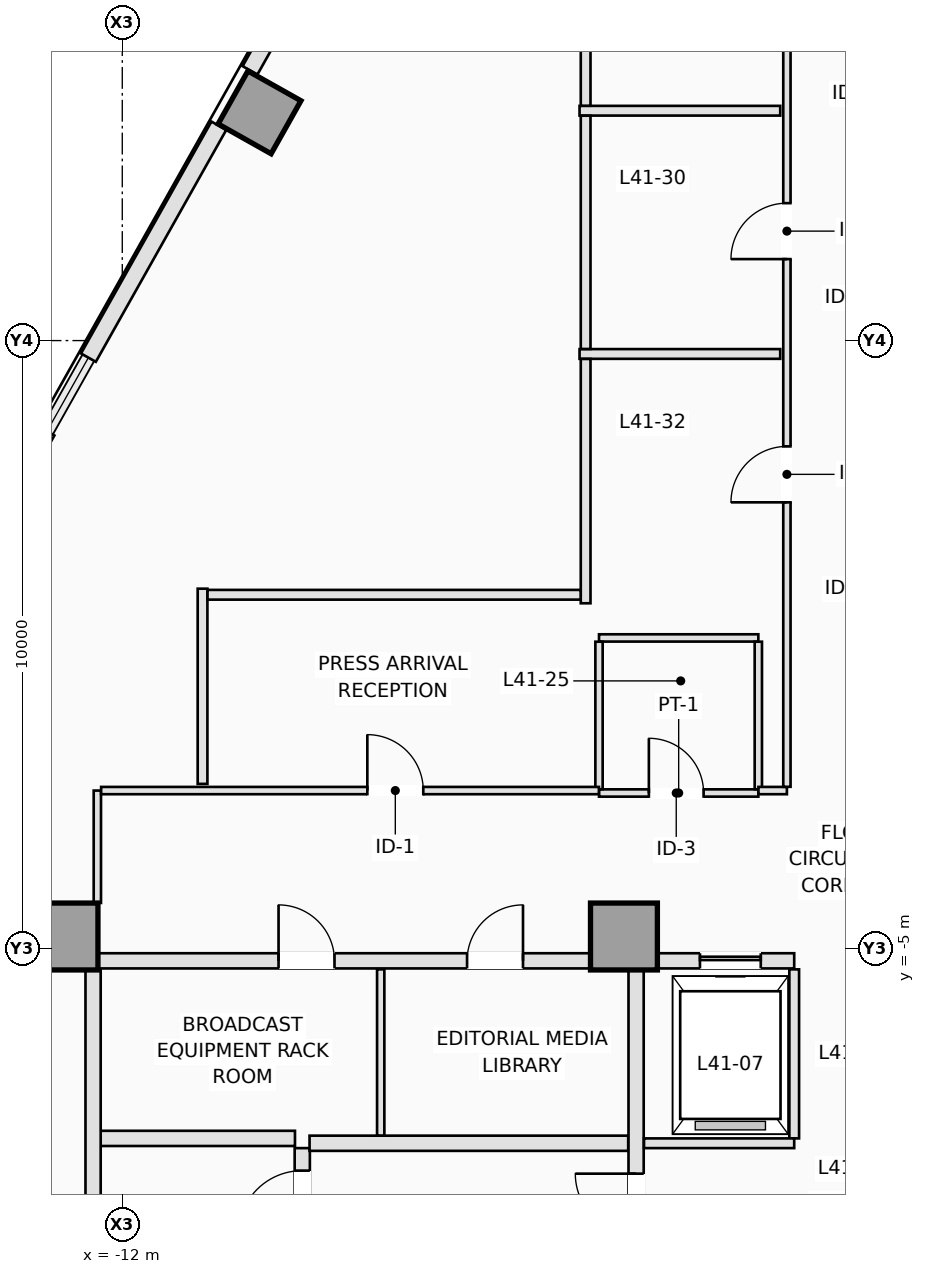
"""IFC4 building model, lengths in metres.
Left out: names, types, materials, properties, quantities, classifications, styles, units other than length and angle.
Written with IfcOpenShell. Run it as: python <this file> out.ifc"""

import sys

from ifc_helpers import new_model, si_unit, direction, frame, frame_2d, origin, origin_2d, place, context, subcontext, project, spatial, rectangle, extrude, element, fill, save


model = new_model("IFC4")
c1 = context("Model", 3, precision=1e-05, world=origin(), true_north=direction((0.0, 1.0)))
c2 = subcontext(c1, "Body", "Model", "MODEL_VIEW")
j1 = project(units=[si_unit("LENGTHUNIT", "METRE"), si_unit("PLANEANGLEUNIT", "RADIAN")], contexts=[c1])
p1 = place(None, origin())
s1 = spatial("IfcSite", under=j1, at=p1, CompositionType="ELEMENT")
p2 = place(p1, origin())
s2 = spatial("IfcBuilding", under=s1, at=p2, CompositionType="ELEMENT")
p3 = place(p2, frame((0.0, 0.0, 151.0)))
s3 = spatial("IfcBuildingStorey", under=s2, at=p3, CompositionType="ELEMENT", Elevation=151.0)
for number, where, z_axis, x_axis in (
    (1, (-12.95, -4.8, 0.0), (0.0, 0.0, 1.0), (1.0, 0.0, 0.0)),
    (2, (-3.75, -4.8, 0.0), (0.0, 0.0, 1.0), (1.0, 0.0, 0.0)),
):
    element("IfcColumn", number, at=place(p3, frame(where, z_axis=z_axis, x_axis=x_axis)), inside=s3, PredefinedType="COLUMN", context=c2, shape_type="SweptSolid", body=[
        extrude(rectangle(XDim=1.1, YDim=1.1, at=origin_2d()), origin(), (0.0, 0.0, 1.0), 3.5),
    ])
p4 = place(p3, frame((-9.743, 8.753, 0.0), z_axis=(0.0, 0.0, 1.0), x_axis=(-0.871575139605, 0.490261946333, 0.0)))
e3 = element("IfcColumn", 3, at=p4, inside=s3, PredefinedType="COLUMN", context=c2, shape_type="SweptSolid", body=[
    extrude(rectangle(XDim=1.0, YDim=1.0, at=origin_2d()), origin(), (0.0, 0.0, 1.0), 3.5),
])
p5 = place(p3, frame((-9.9, 9.444, 0.0), z_axis=(0.0, 0.0, 1.0), x_axis=(0.490412424957, 0.871490478116, 0.0)))
e4 = element("IfcWall", 4, at=p5, inside=s3, PredefinedType="STANDARD", context=c2, shape_type="SweptSolid", body=[
    extrude(rectangle(XDim=0.46, YDim=0.28, at=frame_2d((0.23, 0.0))), origin(), (0.0, 0.0, 1.0), 3.25),
])
p6 = place(p3, frame((-15.383, -0.305, 0.0), z_axis=(0.0, 0.0, 1.0), x_axis=(0.490232095789, 0.871591929895, 0.0)))
e5 = element("IfcWall", 5, at=p6, inside=s3, PredefinedType="STANDARD", context=c2, shape_type="SweptSolid", body=[
    extrude(rectangle(XDim=4.375, YDim=0.28, at=frame_2d((2.188, 0.0))), origin(), (0.0, 0.0, 1.0), 3.25),
])
p7 = place(p3, frame((-12.557, 4.72, 0.0), z_axis=(0.0, 0.0, 1.0), x_axis=(0.490274486291, 0.871568085747, 0.0)))
e6 = element("IfcWall", 6, at=p7, inside=s3, PredefinedType="STANDARD", context=c2, shape_type="SweptSolid", body=[
    extrude(rectangle(XDim=4.375, YDim=0.28, at=frame_2d((2.188, 0.0))), origin(), (0.0, 0.0, 1.0), 3.25),
])
p8 = place(p3, frame((-9.04, -10.18, 0.0), z_axis=(0.0, 0.0, 1.0), x_axis=(0.0, 1.0, 0.0)))
e7 = element("IfcWall", 7, at=p8, inside=s3, PredefinedType="PARTITIONING", context=c2, shape_type="SweptSolid", body=[
    extrude(rectangle(XDim=1.9, YDim=0.25, at=frame_2d((0.95, 0.0))), origin(), (0.0, 0.0, 1.0), 3.25),
])
p9 = place(p8, frame((0.48, 0.0, 0.0)))
e8 = element("IfcOpeningElement", 8, at=p9, cuts=e7, PredefinedType="OPENING", context=c2, shape_type="SweptSolid", body=[
    extrude(rectangle(XDim=1.05, YDim=2.15, at=frame_2d((0.525, 1.075))), frame((0.0, 0.135, 0.0), z_axis=(0.0, -1.0, 0.0), x_axis=(1.0, 0.0, 0.0)), (0.0, 0.0, 1.0), 0.27),
])
p10 = place(p3, frame((-12.38, -8.12, 0.0), z_axis=(0.0, 0.0, 1.0), x_axis=(1.0, 0.0, 0.0)))
e9 = element("IfcWall", 9, at=p10, inside=s3, PredefinedType="PARTITIONING", context=c2, shape_type="SweptSolid", body=[
    extrude(rectangle(XDim=3.22, YDim=0.25, at=frame_2d((1.61, 0.0))), origin(), (0.0, 0.0, 1.0), 3.25),
])
p11 = place(p3, frame((-12.48, -10.18, 0.0), z_axis=(0.0, 0.0, 1.0), x_axis=(0.0, 1.0, 0.0)))
e10 = element("IfcWall", 10, at=p11, inside=s3, PredefinedType="PARTITIONING", context=c2, shape_type="SweptSolid", body=[
    extrude(rectangle(XDim=4.828, YDim=0.25, at=frame_2d((2.414, 0.0))), origin(), (0.0, 0.0, 1.0), 3.25),
])
p12 = place(p3, frame((-8.92, -8.2, 0.0), z_axis=(0.0, 0.0, 1.0), x_axis=(1.0, 0.0, 0.0)))
e11 = element("IfcWall", 11, at=p12, inside=s3, PredefinedType="PARTITIONING", context=c2, shape_type="SweptSolid", body=[
    extrude(rectangle(XDim=5.24, YDim=0.25, at=frame_2d((2.62, 0.0))), origin(), (0.0, 0.0, 1.0), 3.25),
])
p13 = place(p3, frame((-3.55, -15.798, 0.0), z_axis=(0.0, 0.0, 1.0), x_axis=(0.0, 1.0, 0.0)))
e12 = element("IfcWall", 12, at=p13, inside=s3, PredefinedType="PARTITIONING", context=c2, shape_type="SweptSolid", body=[
    extrude(rectangle(XDim=10.446, YDim=0.25, at=frame_2d((5.223, 0.0))), origin(), (0.0, 0.0, 1.0), 3.25),
])
p14 = place(p13, frame((6.098, 0.0, 0.0)))
e13 = element("IfcOpeningElement", 13, at=p14, cuts=e12, PredefinedType="OPENING", context=c2, shape_type="SweptSolid", body=[
    extrude(rectangle(XDim=1.0, YDim=2.15, at=frame_2d((0.5, 1.075))), frame((0.0, 0.135, 0.0), z_axis=(0.0, -1.0, 0.0), x_axis=(1.0, 0.0, 0.0)), (0.0, 0.0, 1.0), 0.27),
])
p15 = place(p3, frame((-12.398, -5.2, 0.0), z_axis=(0.0, 0.0, 1.0), x_axis=(1.0, 0.0, 0.0)))
e14 = element("IfcWall", 14, at=p15, inside=s3, PredefinedType="PARTITIONING", context=c2, shape_type="SweptSolid", body=[
    extrude(rectangle(XDim=8.096, YDim=0.25, at=frame_2d((4.048, 0.0))), origin(), (0.0, 0.0, 1.0), 3.25),
])
p16 = place(p15, frame((2.968, 0.0, 0.0)))
e15 = element("IfcOpeningElement", 15, at=p16, cuts=e14, PredefinedType="OPENING", context=c2, shape_type="SweptSolid", body=[
    extrude(rectangle(XDim=0.92, YDim=2.12, at=frame_2d((0.46, 1.06))), frame((0.0, 0.135, 0.0), z_axis=(0.0, -1.0, 0.0), x_axis=(1.0, 0.0, 0.0)), (0.0, 0.0, 1.0), 0.27),
])
p17 = place(p15, frame((6.068, 0.0, 0.0)))
e16 = element("IfcOpeningElement", 16, at=p17, cuts=e14, PredefinedType="OPENING", context=c2, shape_type="SweptSolid", body=[
    extrude(rectangle(XDim=0.92, YDim=2.12, at=frame_2d((0.46, 1.06))), frame((0.0, 0.135, 0.0), z_axis=(0.0, -1.0, 0.0), x_axis=(1.0, 0.0, 0.0)), (0.0, 0.0, 1.0), 0.27),
])
p18 = place(p3, frame((-3.198, -5.2, 0.0), z_axis=(0.0, 0.0, 1.0), x_axis=(1.0, 0.0, 0.0)))
e17 = element("IfcWall", 17, at=p18, inside=s3, PredefinedType="PARTITIONING", context=c2, shape_type="SweptSolid", body=[
    extrude(rectangle(XDim=2.248, YDim=0.25, at=frame_2d((1.124, 0.0))), origin(), (0.0, 0.0, 1.0), 3.25),
])
p19 = place(p18, frame((0.698, 0.0, 0.0)))
e18 = element("IfcOpeningElement", 18, at=p19, cuts=e17, PredefinedType="OPENING", context=c2, shape_type="SweptSolid", body=[
    extrude(rectangle(XDim=1.0, YDim=2.15, at=frame_2d((0.5, 1.075))), frame((0.0, 0.135, 0.0), z_axis=(0.0, -1.0, 0.0), x_axis=(1.0, 0.0, 0.0)), (0.0, 0.0, 1.0), 0.27),
])
p20 = place(p3, frame((-7.75, -8.073, 0.0), z_axis=(0.0, 0.0, 1.0), x_axis=(0.0, 1.0, 0.0)))
e19 = element("IfcWall", 19, at=p20, inside=s3, PredefinedType="PARTITIONING", context=c2, shape_type="SweptSolid", body=[
    extrude(rectangle(XDim=2.733, YDim=0.12, at=frame_2d((1.366, 0.0))), origin(), (0.0, 0.0, 1.0), 3.25),
])
p21 = place(p3, frame((-0.95, -8.12, 0.0), z_axis=(0.0, 0.0, 1.0), x_axis=(0.0, 1.0, 0.0)))
e20 = element("IfcWall", 20, at=p21, inside=s3, PredefinedType="PARTITIONING", context=c2, shape_type="SweptSolid", body=[
    extrude(rectangle(XDim=2.78, YDim=0.16, at=frame_2d((1.39, 0.0))), origin(), (0.0, 0.0, 1.0), 3.25),
])
p22 = place(p3, frame((-3.42, -8.2, 0.0), z_axis=(0.0, 0.0, 1.0), x_axis=(1.0, 0.0, 0.0)))
e21 = element("IfcWall", 21, at=p22, inside=s3, PredefinedType="PARTITIONING", context=c2, shape_type="SweptSolid", body=[
    extrude(rectangle(XDim=2.47, YDim=0.16, at=frame_2d((1.235, 0.0))), origin(), (0.0, 0.0, 1.0), 3.25),
])
p23 = place(p3, frame((-4.16, -2.44, 0.0), z_axis=(0.0, 0.0, 1.0), x_axis=(1.0, 0.0, 0.0)))
e22 = element("IfcWall", 22, at=p23, inside=s3, PredefinedType="PARTITIONING", context=c2, shape_type="SweptSolid", body=[
    extrude(rectangle(XDim=2.62, YDim=0.12, at=frame_2d((1.31, 0.0))), origin(), (0.0, 0.0, 1.0), 2.891),
])
p24 = place(p23, frame((0.82, 0.0, 0.0)))
e23 = element("IfcOpeningElement", 23, at=p24, cuts=e22, PredefinedType="OPENING", context=c2, shape_type="SweptSolid", body=[
    extrude(rectangle(XDim=0.9, YDim=2.12, at=frame_2d((0.45, 1.06))), frame((0.0, 0.07, 0.0), z_axis=(0.0, -1.0, 0.0), x_axis=(1.0, 0.0, 0.0)), (0.0, 0.0, 1.0), 0.14),
])
p25 = place(p3, frame((-4.16, 0.11, 0.0), z_axis=(0.0, 0.0, 1.0), x_axis=(1.0, 0.0, 0.0)))
e24 = element("IfcWall", 24, at=p25, inside=s3, PredefinedType="PARTITIONING", context=c2, shape_type="SweptSolid", body=[
    extrude(rectangle(XDim=2.62, YDim=0.12, at=frame_2d((1.31, 0.0))), origin(), (0.0, 0.0, 1.0), 3.25),
])
for number, where, z_axis, x_axis in (
    (25, (-4.16, -2.378, 0.0), (0.0, 0.0, 1.0), (0.0, 1.0, 0.0)),
    (26, (-1.54, -2.378, 0.0), (0.0, 0.0, 1.0), (0.0, 1.0, 0.0)),
):
    element("IfcWall", number, at=place(p3, frame(where, z_axis=z_axis, x_axis=x_axis)), inside=s3, PredefinedType="PARTITIONING", context=c2, shape_type="SweptSolid", body=[
        extrude(rectangle(XDim=2.426, YDim=0.12, at=frame_2d((1.213, 0.0))), origin(), (0.0, 0.0, 1.0), 3.25),
    ])
p26 = place(p3, frame((-12.41, -4.248, 0.0), z_axis=(0.0, 0.0, 1.0), x_axis=(0.0, 1.0, 0.0)))
e27 = element("IfcWall", 27, at=p26, inside=s3, PredefinedType="PARTITIONING", context=c2, shape_type="SweptSolid", body=[
    extrude(rectangle(XDim=1.848, YDim=0.12, at=frame_2d((0.924, 0.0))), origin(), (0.0, 0.0, 1.0), 3.25),
])
p27 = place(p3, frame((-12.348, -2.4, 0.0), z_axis=(0.0, 0.0, 1.0), x_axis=(1.0, 0.0, 0.0)))
e28 = element("IfcWall", 28, at=p27, inside=s3, PredefinedType="PARTITIONING", context=c2, shape_type="SweptSolid", body=[
    extrude(rectangle(XDim=8.186, YDim=0.12, at=frame_2d((4.093, 0.0))), origin(), (0.0, 0.0, 1.0), 2.891),
])
p28 = place(p27, frame((4.378, 0.0, 0.0)))
e29 = element("IfcOpeningElement", 29, at=p28, cuts=e28, PredefinedType="OPENING", context=c2, shape_type="SweptSolid", body=[
    extrude(rectangle(XDim=0.92, YDim=2.12, at=frame_2d((0.46, 1.06))), frame((0.0, 0.07, 0.0), z_axis=(0.0, -1.0, 0.0), x_axis=(1.0, 0.0, 0.0)), (0.0, 0.0, 1.0), 0.14),
])
p29 = place(p3, frame((-1.538, -2.4, 0.0), z_axis=(0.0, 0.0, 1.0), x_axis=(1.0, 0.0, 0.0)))
e30 = element("IfcWall", 30, at=p29, inside=s3, PredefinedType="PARTITIONING", context=c2, shape_type="SweptSolid", body=[
    extrude(rectangle(XDim=0.468, YDim=0.12, at=frame_2d((0.234, 0.0))), origin(), (0.0, 0.0, 1.0), 2.891),
])
p30 = place(p3, frame((-1.07, -2.338, 0.0), z_axis=(0.0, 0.0, 1.0), x_axis=(0.0, 1.0, 0.0)))
e31 = element("IfcWall", 31, at=p30, inside=s3, PredefinedType="PARTITIONING", context=c2, shape_type="SweptSolid", body=[
    extrude(rectangle(XDim=12.338, YDim=0.12, at=frame_2d((6.169, 0.0))), origin(), (0.0, 0.0, 1.0), 3.25),
])
p31 = place(p30, frame((8.678, 0.0, 0.0)))
e32 = element("IfcOpeningElement", 32, at=p31, cuts=e31, PredefinedType="OPENING", context=c2, shape_type="SweptSolid", body=[
    extrude(rectangle(XDim=0.92, YDim=2.12, at=frame_2d((0.46, 1.06))), frame((0.0, 0.07, 0.0), z_axis=(0.0, -1.0, 0.0), x_axis=(1.0, 0.0, 0.0)), (0.0, 0.0, 1.0), 0.14),
])
p32 = place(p30, frame((4.678, 0.0, 0.0)))
e33 = element("IfcOpeningElement", 33, at=p32, cuts=e31, PredefinedType="OPENING", context=c2, shape_type="SweptSolid", body=[
    extrude(rectangle(XDim=0.92, YDim=2.12, at=frame_2d((0.46, 1.06))), frame((0.0, 0.07, 0.0), z_axis=(0.0, -1.0, 0.0), x_axis=(1.0, 0.0, 0.0)), (0.0, 0.0, 1.0), 0.14),
])
p33 = place(p3, frame((-1.18, 8.78, 0.0), z_axis=(0.0, 0.0, 1.0), x_axis=(-1.0, 0.0, 0.0)))
e34 = element("IfcWall", 34, at=p33, inside=s3, PredefinedType="PARTITIONING", context=c2, shape_type="SweptSolid", body=[
    extrude(rectangle(XDim=3.3, YDim=0.16, at=frame_2d((1.65, 0.0))), origin(), (0.0, 0.0, 1.0), 3.25),
])
p34 = place(p3, frame((-4.38, 8.862, 0.0), z_axis=(0.0, 0.0, 1.0), x_axis=(0.0, 1.0, 0.0)))
e35 = element("IfcWall", 35, at=p34, inside=s3, PredefinedType="PARTITIONING", context=c2, shape_type="SweptSolid", body=[
    extrude(rectangle(XDim=9.553, YDim=0.16, at=frame_2d((4.777, 0.0))), origin(), (0.0, 0.0, 1.0), 3.25),
])
p35 = place(p3, frame((-1.18, 4.78, 0.0), z_axis=(0.0, 0.0, 1.0), x_axis=(-1.0, 0.0, 0.0)))
e36 = element("IfcWall", 36, at=p35, inside=s3, PredefinedType="PARTITIONING", context=c2, shape_type="SweptSolid", body=[
    extrude(rectangle(XDim=3.3, YDim=0.16, at=frame_2d((1.65, 0.0))), origin(), (0.0, 0.0, 1.0), 3.25),
])
p36 = place(p3, frame((-4.38, 4.862, 0.0), z_axis=(0.0, 0.0, 1.0), x_axis=(0.0, 1.0, 0.0)))
e37 = element("IfcWall", 37, at=p36, inside=s3, PredefinedType="PARTITIONING", context=c2, shape_type="SweptSolid", body=[
    extrude(rectangle(XDim=3.836, YDim=0.16, at=frame_2d((1.918, 0.0))), origin(), (0.0, 0.0, 1.0), 3.25),
])
p37 = place(p3, frame((-4.38, 0.68, 0.0), z_axis=(0.0, 0.0, 1.0), x_axis=(0.0, 1.0, 0.0)))
e38 = element("IfcWall", 38, at=p37, inside=s3, PredefinedType="PARTITIONING", context=c2, shape_type="SweptSolid", body=[
    extrude(rectangle(XDim=4.018, YDim=0.16, at=frame_2d((2.009, 0.0))), origin(), (0.0, 0.0, 1.0), 3.25),
])
p38 = place(p3, frame((-10.68, -2.29, 0.0), z_axis=(0.0, 0.0, 1.0), x_axis=(0.0, 1.0, 0.0)))
e39 = element("IfcWall", 39, at=p38, inside=s3, PredefinedType="PARTITIONING", context=c2, shape_type="SweptSolid", body=[
    extrude(rectangle(XDim=3.21, YDim=0.16, at=frame_2d((1.605, 0.0))), origin(), (0.0, 0.0, 1.0), 3.25),
])
p39 = place(p3, frame((-10.598, 0.82, 0.0), z_axis=(0.0, 0.0, 1.0), x_axis=(1.0, 0.0, 0.0)))
e40 = element("IfcWall", 40, at=p39, inside=s3, PredefinedType="PARTITIONING", context=c2, shape_type="SweptSolid", body=[
    extrude(rectangle(XDim=6.136, YDim=0.16, at=frame_2d((3.068, 0.0))), origin(), (0.0, 0.0, 1.0), 3.25),
])
p40 = place(p19, origin())
e41 = element("IfcDoor", 41, at=p40, inside=s3, OperationType="SLIDING_TO_LEFT", PredefinedType="DOOR", context=c2, shape_type="SweptSolid", body=[
    extrude(rectangle(XDim=1.0, YDim=2.15, at=frame_2d((0.5, 1.075))), frame((0.0, 0.025, 0.0), z_axis=(0.0, -1.0, 0.0), x_axis=(1.0, 0.0, 0.0)), (0.0, 0.0, 1.0), 0.05),
])
fill(e18, e41)
p41 = place(p9, origin())
e42 = element("IfcDoor", 42, at=p41, inside=s3, OperationType="SINGLE_SWING_LEFT", PredefinedType="DOOR", context=c2, shape_type="SweptSolid", body=[
    extrude(rectangle(XDim=1.05, YDim=2.15, at=frame_2d((0.525, 1.075))), frame((0.0, 0.025, 0.0), z_axis=(0.0, -1.0, 0.0), x_axis=(1.0, 0.0, 0.0)), (0.0, 0.0, 1.0), 0.05),
])
fill(e8, e42)
p42 = place(p14, origin())
e43 = element("IfcDoor", 43, at=p42, inside=s3, OperationType="SINGLE_SWING_RIGHT", PredefinedType="DOOR", context=c2, shape_type="SweptSolid", body=[
    extrude(rectangle(XDim=1.0, YDim=2.15, at=frame_2d((0.5, 1.075))), frame((0.0, 0.025, 0.0), z_axis=(0.0, -1.0, 0.0), x_axis=(1.0, 0.0, 0.0)), (0.0, 0.0, 1.0), 0.05),
])
fill(e13, e43)
p43 = place(p16, origin())
e44 = element("IfcDoor", 44, at=p43, inside=s3, OperationType="SINGLE_SWING_LEFT", PredefinedType="DOOR", context=c2, shape_type="SweptSolid", body=[
    extrude(rectangle(XDim=0.92, YDim=2.12, at=frame_2d((0.46, 1.06))), frame((0.0, 0.025, 0.0), z_axis=(0.0, -1.0, 0.0), x_axis=(1.0, 0.0, 0.0)), (0.0, 0.0, 1.0), 0.05),
])
fill(e15, e44)
p44 = place(p17, origin())
e45 = element("IfcDoor", 45, at=p44, inside=s3, OperationType="SINGLE_SWING_RIGHT", PredefinedType="DOOR", context=c2, shape_type="SweptSolid", body=[
    extrude(rectangle(XDim=0.92, YDim=2.12, at=frame_2d((0.46, 1.06))), frame((0.0, 0.025, 0.0), z_axis=(0.0, -1.0, 0.0), x_axis=(1.0, 0.0, 0.0)), (0.0, 0.0, 1.0), 0.05),
])
fill(e16, e45)
p45 = place(p24, origin())
e46 = element("IfcDoor", 46, at=p45, inside=s3, OperationType="SINGLE_SWING_LEFT", PredefinedType="DOOR", context=c2, shape_type="SweptSolid", body=[
    extrude(rectangle(XDim=0.9, YDim=2.12, at=frame_2d((0.45, 1.06))), frame((0.0, 0.025, 0.0), z_axis=(0.0, -1.0, 0.0), x_axis=(1.0, 0.0, 0.0)), (0.0, 0.0, 1.0), 0.05),
])
fill(e23, e46)
p46 = place(p31, origin())
e47 = element("IfcDoor", 47, at=p46, inside=s3, OperationType="SINGLE_SWING_LEFT", PredefinedType="DOOR", context=c2, shape_type="SweptSolid", body=[
    extrude(rectangle(XDim=0.92, YDim=2.12, at=frame_2d((0.46, 1.06))), frame((0.0, 0.025, 0.0), z_axis=(0.0, -1.0, 0.0), x_axis=(1.0, 0.0, 0.0)), (0.0, 0.0, 1.0), 0.05),
])
fill(e32, e47)
p47 = place(p32, origin())
e48 = element("IfcDoor", 48, at=p47, inside=s3, OperationType="SINGLE_SWING_LEFT", PredefinedType="DOOR", context=c2, shape_type="SweptSolid", body=[
    extrude(rectangle(XDim=0.92, YDim=2.12, at=frame_2d((0.46, 1.06))), frame((0.0, 0.025, 0.0), z_axis=(0.0, -1.0, 0.0), x_axis=(1.0, 0.0, 0.0)), (0.0, 0.0, 1.0), 0.05),
])
fill(e33, e48)
p48 = place(p28, origin())
e49 = element("IfcDoor", 49, at=p48, inside=s3, OperationType="SINGLE_SWING_LEFT", PredefinedType="DOOR", context=c2, shape_type="SweptSolid", body=[
    extrude(rectangle(XDim=0.92, YDim=2.12, at=frame_2d((0.46, 1.06))), frame((0.0, 0.025, 0.0), z_axis=(0.0, -1.0, 0.0), x_axis=(1.0, 0.0, 0.0)), (0.0, 0.0, 1.0), 0.05),
])
fill(e29, e49)
save(model, sys.argv[1])
